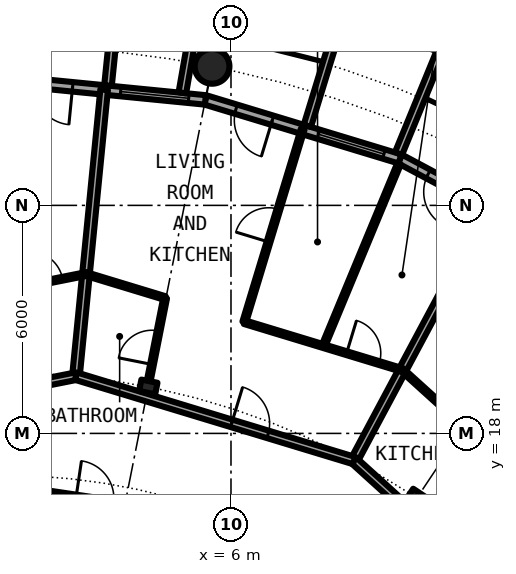
"""IFC4 building model, lengths in metres.
Left out: names, types, materials, properties, quantities, classifications, styles, units other than length and angle.
Written with IfcOpenShell. Run it as: python <this file> out.ifc"""

import sys

from ifc_helpers import new_model, si_unit, direction, frame, frame_2d, origin, origin_2d, place, context, subcontext, project, spatial, rectangle, circle, hollow_circle, i_section, extrude, element, fill, save


model = new_model("IFC4")
c1 = context("Model", 3, precision=1e-05, world=origin(), true_north=direction((0.0, 1.0)))
c2 = subcontext(c1, "Body", "Model", "MODEL_VIEW")
j1 = project(units=[si_unit("LENGTHUNIT", "METRE"), si_unit("PLANEANGLEUNIT", "RADIAN")], contexts=[c1])
p1 = place(None, origin())
s1 = spatial("IfcSite", under=j1, at=p1, CompositionType="ELEMENT")
p2 = place(p1, origin())
s2 = spatial("IfcBuilding", under=s1, at=p2, CompositionType="ELEMENT")
p3 = place(p2, frame((0.0, 0.0, 129.95)))
s3 = spatial("IfcBuildingStorey", under=s2, at=p3, CompositionType="ELEMENT", Elevation=129.95)
p4 = place(p3, frame((5.501, 27.658, 0.0), z_axis=(0.0, 0.0, 1.0), x_axis=(1.0, 0.0, 0.0)))
e1 = element("IfcColumn", 1, at=p4, inside=s3, PredefinedType="COLUMN", context=c2, shape_type="SweptSolid", body=[
    extrude(hollow_circle(Radius=0.457, WallThickness=0.04, at=origin_2d()), origin(), (0.0, 0.0, 1.0), 3.05),
])
for number, where, z_axis, x_axis in (
    (2, (10.889, 16.297, 0.0), (0.0, 0.0, 1.0), (0.556, 0.831, 0.0)),
    (3, (3.824, 19.223, 0.0), (0.0, 0.0, 1.0), (0.195, 0.981, 0.0)),
):
    element("IfcColumn", number, at=place(p3, frame(where, z_axis=z_axis, x_axis=x_axis)), inside=s3, PredefinedType="COLUMN", context=c2, shape_type="SweptSolid", body=[
        extrude(i_section(OverallWidth=0.307, OverallDepth=0.432, WebThickness=0.021, FlangeThickness=0.04, FilletRadius=0.027, at=origin_2d()), origin(), (0.0, 0.0, 1.0), 3.05),
    ])
p5 = place(p3, frame((15.167, 22.699, 0.0), z_axis=(0.0, 0.0, 1.0), x_axis=(-0.881915646801, 0.471407246368, 0.0)))
e4 = element("IfcWall", 4, at=p5, inside=s3, PredefinedType="SOLIDWALL", context=c2, shape_type="SweptSolid", body=[
    extrude(rectangle(XDim=5.352, YDim=0.25, at=frame_2d((2.676, 0.0))), origin(), (0.0, 0.0, 1.0), 2.7),
])
p6 = place(p5, frame((0.441, 0.0, 0.3)))
e5 = element("IfcOpeningElement", 5, at=p6, cuts=e4, PredefinedType="OPENING", context=c2, shape_type="SweptSolid", body=[
    extrude(rectangle(XDim=1.8, YDim=2.1, at=frame_2d((0.9, 1.05))), frame((0.0, 0.135, 0.0), z_axis=(0.0, -1.0, 0.0), x_axis=(1.0, 0.0, 0.0)), (0.0, 0.0, 1.0), 0.27),
])
p7 = place(p5, frame((3.51, 0.0, 0.0)))
e6 = element("IfcOpeningElement", 6, at=p7, cuts=e4, PredefinedType="OPENING", context=c2, shape_type="SweptSolid", body=[
    extrude(rectangle(XDim=1.0, YDim=2.2, at=frame_2d((0.5, 1.1))), frame((0.0, 0.135, 0.0), z_axis=(0.0, -1.0, 0.0), x_axis=(1.0, 0.0, 0.0)), (0.0, 0.0, 1.0), 0.27),
])
p8 = place(p3, frame((10.447, 25.222, 0.0), z_axis=(0.0, 0.0, 1.0), x_axis=(-0.956965678721, 0.290201119486, 0.0)))
e7 = element("IfcWall", 7, at=p8, inside=s3, PredefinedType="SOLIDWALL", context=c2, shape_type="SweptSolid", body=[
    extrude(rectangle(XDim=5.351, YDim=0.25, at=frame_2d((2.676, 0.0))), origin(), (0.0, 0.0, 1.0), 2.7),
])
p9 = place(p8, frame((0.441, 0.0, 0.3)))
e8 = element("IfcOpeningElement", 8, at=p9, cuts=e7, PredefinedType="OPENING", context=c2, shape_type="SweptSolid", body=[
    extrude(rectangle(XDim=1.8, YDim=2.1, at=frame_2d((0.9, 1.05))), frame((0.0, 0.135, 0.0), z_axis=(0.0, -1.0, 0.0), x_axis=(1.0, 0.0, 0.0)), (0.0, 0.0, 1.0), 0.27),
])
p10 = place(p8, frame((3.51, 0.0, 0.0)))
e9 = element("IfcOpeningElement", 9, at=p10, cuts=e7, PredefinedType="OPENING", context=c2, shape_type="SweptSolid", body=[
    extrude(rectangle(XDim=1.0, YDim=2.2, at=frame_2d((0.5, 1.1))), frame((0.0, 0.135, 0.0), z_axis=(0.0, -1.0, 0.0), x_axis=(1.0, 0.0, 0.0)), (0.0, 0.0, 1.0), 0.27),
])
p11 = place(p3, frame((11.638, 28.084, -0.03), z_axis=(0.0, 0.0, 1.0), x_axis=(-0.941461077774, 0.337121697664, 0.0)))
e10 = element("IfcWall", 10, at=p11, inside=s3, PredefinedType="SOLIDWALL", context=c2, shape_type="SweptSolid", body=[
    extrude(rectangle(XDim=2.993, YDim=0.2, at=frame_2d((1.497, 0.0))), origin(), (0.0, 0.0, 1.0), 2.73),
])
p12 = place(p11, frame((0.457, 0.0, 0.33)))
e11 = element("IfcOpeningElement", 11, at=p12, cuts=e10, PredefinedType="OPENING", context=c2, shape_type="SweptSolid", body=[
    extrude(circle(Radius=1.04, at=frame_2d((1.04, 1.04))), frame((0.0, 0.11, 0.0), z_axis=(0.0, -1.0, 0.0), x_axis=(1.0, 0.0, 0.0)), (0.0, 0.0, 1.0), 0.22),
])
p13 = place(p3, frame((10.409, 25.364, -0.03), z_axis=(0.0, 0.0, 1.0), x_axis=(0.379509886562, 0.925187681501, 0.0)))
e12 = element("IfcWall", 12, at=p13, inside=s3, PredefinedType="SOLIDWALL", context=c2, shape_type="SweptSolid", body=[
    extrude(rectangle(XDim=2.883, YDim=0.2, at=frame_2d((1.441, 0.0))), origin(), (0.0, 0.0, 1.0), 2.73),
])
p14 = place(p3, frame((8.009, 26.092, -0.03), z_axis=(0.0, 0.0, 1.0), x_axis=(0.293406695073, 0.955987715029, 0.0)))
e13 = element("IfcWall", 13, at=p14, inside=s3, PredefinedType="SOLIDWALL", context=c2, shape_type="SweptSolid", body=[
    extrude(rectangle(XDim=3.006, YDim=0.2, at=frame_2d((1.503, 0.0))), origin(), (0.0, 0.0, 1.0), 2.73),
])
p15 = place(p3, frame((5.326, 26.775, 0.0), z_axis=(0.0, 0.0, 1.0), x_axis=(-0.995173996315, 0.098126026407, 0.0)))
e14 = element("IfcWall", 14, at=p15, inside=s3, PredefinedType="SOLIDWALL", context=c2, shape_type="SweptSolid", body=[
    extrude(rectangle(XDim=5.352, YDim=0.25, at=frame_2d((2.676, 0.0))), origin(), (0.0, 0.0, 1.0), 2.7),
])
p16 = place(p15, frame((0.441, 0.0, 0.3)))
e15 = element("IfcOpeningElement", 15, at=p16, cuts=e14, PredefinedType="OPENING", context=c2, shape_type="SweptSolid", body=[
    extrude(rectangle(XDim=1.8, YDim=2.1, at=frame_2d((0.9, 1.05))), frame((0.0, 0.135, 0.0), z_axis=(0.0, -1.0, 0.0), x_axis=(1.0, 0.0, 0.0)), (0.0, 0.0, 1.0), 0.27),
])
p17 = place(p15, frame((3.51, 0.0, 0.0)))
e16 = element("IfcOpeningElement", 16, at=p17, cuts=e14, PredefinedType="OPENING", context=c2, shape_type="SweptSolid", body=[
    extrude(rectangle(XDim=1.0, YDim=2.2, at=frame_2d((0.5, 1.1))), frame((0.0, 0.135, 0.0), z_axis=(0.0, -1.0, 0.0), x_axis=(1.0, 0.0, 0.0)), (0.0, 0.0, 1.0), 0.27),
])
p18 = place(p3, frame((4.72, 26.961, -0.03), z_axis=(0.0, 0.0, 1.0), x_axis=(0.172463232037, 0.98501595601, 0.0)))
e17 = element("IfcWall", 17, at=p18, inside=s3, PredefinedType="SOLIDWALL", context=c2, shape_type="SweptSolid", body=[
    extrude(rectangle(XDim=2.929, YDim=0.2, at=frame_2d((1.464, 0.0))), origin(), (0.0, 0.0, 1.0), 2.73),
])
p19 = place(p3, frame((2.764, 27.153, -0.03), z_axis=(0.0, 0.0, 1.0), x_axis=(0.101505487237, 0.994834979311, 0.0)))
e18 = element("IfcWall", 18, at=p19, inside=s3, PredefinedType="SOLIDWALL", context=c2, shape_type="SweptSolid", body=[
    extrude(rectangle(XDim=3.007, YDim=0.2, at=frame_2d((1.503, 0.0))), origin(), (0.0, 0.0, 1.0), 2.73),
])
p20 = place(p3, frame((1.92, 19.506, 0.0), z_axis=(0.0, 0.0, 1.0), x_axis=(0.097987704654, 0.995187625394, 0.0)))
e19 = element("IfcWall", 19, at=p20, inside=s3, PredefinedType="PARTITIONING", context=c2, shape_type="SweptSolid", body=[
    extrude(rectangle(XDim=7.574, YDim=0.2, at=frame_2d((3.787, 0.0))), origin(), (0.0, 0.0, 1.0), 2.7),
])
p21 = place(p3, frame((3.847, 19.439, 0.0), z_axis=(0.0, 0.0, 1.0), x_axis=(0.194227580483, 0.980956495967, 0.0)))
e20 = element("IfcWall", 20, at=p21, inside=s3, PredefinedType="PARTITIONING", context=c2, shape_type="SweptSolid", body=[
    extrude(rectangle(XDim=2.163, YDim=0.1, at=frame_2d((1.082, 0.0))), origin(), (0.0, 0.0, 1.0), 2.7),
])
p22 = place(p21, frame((0.383, 0.0, 0.0)))
e21 = element("IfcOpeningElement", 21, at=p22, cuts=e20, PredefinedType="OPENING", context=c2, shape_type="SweptSolid", body=[
    extrude(rectangle(XDim=0.9, YDim=2.3, at=frame_2d((0.45, 1.15))), frame((0.0, 0.06, 0.0), z_axis=(0.0, -1.0, 0.0), x_axis=(1.0, 0.0, 0.0)), (0.0, 0.0, 1.0), 0.12),
])
p23 = place(p3, frame((6.349, 20.93, 0.0), z_axis=(0.0, 0.0, 1.0), x_axis=(0.290172218727, 0.956974442438, 0.0)))
e22 = element("IfcWall", 22, at=p23, inside=s3, PredefinedType="PARTITIONING", context=c2, shape_type="SweptSolid", body=[
    extrude(rectangle(XDim=5.303, YDim=0.1, at=frame_2d((2.652, 0.0))), origin(), (0.0, 0.0, 1.0), 2.7),
])
p24 = place(p23, frame((2.202, 0.0, 0.0)))
e23 = element("IfcOpeningElement", 23, at=p24, cuts=e22, PredefinedType="OPENING", context=c2, shape_type="SweptSolid", body=[
    extrude(rectangle(XDim=0.9, YDim=2.3, at=frame_2d((0.45, 1.15))), frame((0.0, 0.06, 0.0), z_axis=(0.0, -1.0, 0.0), x_axis=(1.0, 0.0, 0.0)), (0.0, 0.0, 1.0), 0.12),
])
p25 = place(p3, frame((8.431, 20.298, 0.0), z_axis=(0.0, 0.0, 1.0), x_axis=(0.383480536297, 0.923548958248, 0.0)))
e24 = element("IfcWall", 24, at=p25, inside=s3, PredefinedType="PARTITIONING", context=c2, shape_type="SweptSolid", body=[
    extrude(rectangle(XDim=5.195, YDim=0.1, at=frame_2d((2.598, 0.0))), origin(), (0.0, 0.0, 1.0), 2.7),
])
p26 = place(p3, frame((9.239, 17.286, 0.0), z_axis=(0.0, 0.0, 1.0), x_axis=(0.471439510802, 0.881898399848, 0.0)))
e25 = element("IfcWall", 25, at=p26, inside=s3, PredefinedType="PARTITIONING", context=c2, shape_type="SweptSolid", body=[
    extrude(rectangle(XDim=7.575, YDim=0.2, at=frame_2d((3.787, 0.0))), origin(), (0.0, 0.0, 1.0), 2.7),
])
p27 = place(p3, frame((-1.656, 16.819, 0.0), z_axis=(0.0, 0.0, 1.0), x_axis=(0.989174071716, -0.146746910856, 0.0)))
e26 = element("IfcWall", 26, at=p27, inside=s3, PredefinedType="PARTITIONING", context=c2, shape_type="SweptSolid", body=[
    extrude(rectangle(XDim=8.212, YDim=0.2, at=frame_2d((4.106, 0.0))), origin(), (0.0, 0.0, 1.0), 2.7),
])
p28 = place(p27, frame((3.614, 0.0, 0.0)))
e27 = element("IfcOpeningElement", 27, at=p28, cuts=e26, PredefinedType="OPENING", context=c2, shape_type="SweptSolid", body=[
    extrude(rectangle(XDim=1.0, YDim=2.3, at=frame_2d((0.5, 1.15))), frame((0.0, 0.11, 0.0), z_axis=(0.0, -1.0, 0.0), x_axis=(1.0, 0.0, 0.0)), (0.0, 0.0, 1.0), 0.22),
])
p29 = place(p3, frame((-9.239, 17.286, 0.0), z_axis=(0.0, 0.0, 1.0), x_axis=(0.98077905287, 0.195121627328, 0.0)))
e28 = element("IfcWall", 28, at=p29, inside=s3, PredefinedType="PARTITIONING", context=c2, shape_type="SweptSolid", body=[
    extrude(rectangle(XDim=11.379, YDim=0.2, at=frame_2d((5.689, 0.0))), origin(), (0.0, 0.0, 1.0), 2.39),
])
p30 = place(p29, frame((6.138, 0.0, 0.0)))
e29 = element("IfcOpeningElement", 29, at=p30, cuts=e28, PredefinedType="OPENING", context=c2, shape_type="SweptSolid", body=[
    extrude(rectangle(XDim=1.0, YDim=2.3, at=frame_2d((0.5, 1.15))), frame((0.0, 0.11, 0.0), z_axis=(0.0, -1.0, 0.0), x_axis=(1.0, 0.0, 0.0)), (0.0, 0.0, 1.0), 0.22),
])
p31 = place(p3, frame((9.232, 17.289, 0.0), z_axis=(0.0, 0.0, 1.0), x_axis=(0.741112328493, -0.67138105168, 0.0)))
e30 = element("IfcWall", 30, at=p31, inside=s3, PredefinedType="PARTITIONING", context=c2, shape_type="SweptSolid", body=[
    extrude(rectangle(XDim=5.752, YDim=0.2, at=frame_2d((2.876, 0.0))), origin(), (0.0, 0.0, 1.0), 2.7),
])
p32 = place(p31, frame((4.27, 0.0, 0.0)))
e31 = element("IfcOpeningElement", 31, at=p32, cuts=e30, PredefinedType="OPENING", context=c2, shape_type="SweptSolid", body=[
    extrude(rectangle(XDim=1.0, YDim=2.3, at=frame_2d((0.5, 1.15))), frame((0.0, 0.11, 0.0), z_axis=(0.0, -1.0, 0.0), x_axis=(1.0, 0.0, 0.0)), (0.0, 0.0, 1.0), 0.22),
])
p33 = place(p3, frame((1.921, 19.506, 0.0), z_axis=(0.0, 0.0, 1.0), x_axis=(0.956929842753, -0.290319265721, 0.0)))
e32 = element("IfcWall", 32, at=p33, inside=s3, PredefinedType="PARTITIONING", context=c2, shape_type="SweptSolid", body=[
    extrude(rectangle(XDim=7.647, YDim=0.2, at=frame_2d((3.824, 0.0))), origin(), (0.0, 0.0, 1.0), 2.39),
])
p34 = place(p33, frame((4.28, 0.0, 0.0)))
e33 = element("IfcOpeningElement", 33, at=p34, cuts=e32, PredefinedType="OPENING", context=c2, shape_type="SweptSolid", body=[
    extrude(rectangle(XDim=1.0, YDim=2.3, at=frame_2d((0.5, 1.15))), frame((0.0, 0.11, 0.0), z_axis=(0.0, -1.0, 0.0), x_axis=(1.0, 0.0, 0.0)), (0.0, 0.0, 1.0), 0.22),
])
p35 = place(p3, frame((-2.048, 21.351, 0.0), z_axis=(0.0, 0.0, 1.0), x_axis=(0.980784647647, 0.19509350307, 0.0)))
e34 = element("IfcWall", 34, at=p35, inside=s3, PredefinedType="PARTITIONING", context=c2, shape_type="SweptSolid", body=[
    extrude(rectangle(XDim=4.316, YDim=0.1, at=frame_2d((2.158, 0.0))), origin(), (0.0, 0.0, 1.0), 2.7),
])
p36 = place(p35, frame((2.788, 0.0, 0.0)))
e35 = element("IfcOpeningElement", 35, at=p36, cuts=e34, PredefinedType="OPENING", context=c2, shape_type="SweptSolid", body=[
    extrude(rectangle(XDim=0.9, YDim=2.3, at=frame_2d((0.45, 1.15))), frame((0.0, 0.06, 0.0), z_axis=(0.0, -1.0, 0.0), x_axis=(1.0, 0.0, 0.0)), (0.0, 0.0, 1.0), 0.12),
])
p37 = place(p3, frame((10.509, 19.669, 0.0), z_axis=(0.0, 0.0, 1.0), x_axis=(0.7410823244, -0.671414170584, 0.0)))
e36 = element("IfcWall", 36, at=p37, inside=s3, PredefinedType="PARTITIONING", context=c2, shape_type="SweptSolid", body=[
    extrude(rectangle(XDim=4.338, YDim=0.1, at=frame_2d((2.169, 0.0))), origin(), (0.0, 0.0, 1.0), 2.7),
])
p38 = place(p3, frame((2.186, 22.193, 0.0), z_axis=(0.0, 0.0, 1.0), x_axis=(0.956838221976, -0.290621088303, 0.0)))
e37 = element("IfcWall", 37, at=p38, inside=s3, PredefinedType="PARTITIONING", context=c2, shape_type="SweptSolid", body=[
    extrude(rectangle(XDim=2.175, YDim=0.1, at=frame_2d((1.087, 0.0))), origin(), (0.0, 0.0, 1.0), 2.7),
])
p39 = place(p3, frame((6.351, 20.928, 0.0), z_axis=(0.0, 0.0, 1.0), x_axis=(0.956861661621, -0.290543904633, 0.0)))
e38 = element("IfcWall", 38, at=p39, inside=s3, PredefinedType="PARTITIONING", context=c2, shape_type="SweptSolid", body=[
    extrude(rectangle(XDim=4.357, YDim=0.1, at=frame_2d((2.178, 0.0))), origin(), (0.0, 0.0, 1.0), 2.7),
])
p40 = place(p39, frame((2.812, 0.0, 0.0)))
e39 = element("IfcOpeningElement", 39, at=p40, cuts=e38, PredefinedType="OPENING", context=c2, shape_type="SweptSolid", body=[
    extrude(rectangle(XDim=0.9, YDim=2.3, at=frame_2d((0.45, 1.15))), frame((0.0, 0.06, 0.0), z_axis=(0.0, -1.0, 0.0), x_axis=(1.0, 0.0, 0.0)), (0.0, 0.0, 1.0), 0.12),
])
p41 = place(p7, origin())
e40 = element("IfcDoor", 40, at=p41, inside=s3, OperationType="SINGLE_SWING_LEFT", PredefinedType="DOOR", context=c2, shape_type="SweptSolid", body=[
    extrude(rectangle(XDim=1.0, YDim=2.2, at=frame_2d((0.5, 1.1))), frame((0.0, 0.025, 0.0), z_axis=(0.0, -1.0, 0.0), x_axis=(1.0, 0.0, 0.0)), (0.0, 0.0, 1.0), 0.05),
])
fill(e6, e40)
p42 = place(p9, origin())
e41 = element("IfcWindow", 41, at=p42, inside=s3, PartitioningType="SINGLE_PANEL", PredefinedType="WINDOW", context=c2, shape_type="SweptSolid", body=[
    extrude(rectangle(XDim=1.8, YDim=2.1, at=frame_2d((0.9, 1.05))), frame((0.0, 0.03, 0.0), z_axis=(0.0, -1.0, 0.0), x_axis=(1.0, 0.0, 0.0)), (0.0, 0.0, 1.0), 0.06),
])
fill(e8, e41)
p43 = place(p10, origin())
e42 = element("IfcDoor", 42, at=p43, inside=s3, OperationType="SINGLE_SWING_LEFT", PredefinedType="DOOR", context=c2, shape_type="SweptSolid", body=[
    extrude(rectangle(XDim=1.0, YDim=2.2, at=frame_2d((0.5, 1.1))), frame((0.0, 0.025, 0.0), z_axis=(0.0, -1.0, 0.0), x_axis=(1.0, 0.0, 0.0)), (0.0, 0.0, 1.0), 0.05),
])
fill(e9, e42)
p44 = place(p16, origin())
e43 = element("IfcWindow", 43, at=p44, inside=s3, PartitioningType="SINGLE_PANEL", PredefinedType="WINDOW", context=c2, shape_type="SweptSolid", body=[
    extrude(rectangle(XDim=1.8, YDim=2.1, at=frame_2d((0.9, 1.05))), frame((0.0, 0.03, 0.0), z_axis=(0.0, -1.0, 0.0), x_axis=(1.0, 0.0, 0.0)), (0.0, 0.0, 1.0), 0.06),
])
fill(e15, e43)
p45 = place(p17, origin())
e44 = element("IfcDoor", 44, at=p45, inside=s3, OperationType="SINGLE_SWING_LEFT", PredefinedType="DOOR", context=c2, shape_type="SweptSolid", body=[
    extrude(rectangle(XDim=1.0, YDim=2.2, at=frame_2d((0.5, 1.1))), frame((0.0, 0.025, 0.0), z_axis=(0.0, -1.0, 0.0), x_axis=(1.0, 0.0, 0.0)), (0.0, 0.0, 1.0), 0.05),
])
fill(e16, e44)
p46 = place(p34, origin())
e45 = element("IfcDoor", 45, at=p46, inside=s3, OperationType="SINGLE_SWING_RIGHT", PredefinedType="DOOR", context=c2, shape_type="SweptSolid", body=[
    extrude(rectangle(XDim=1.0, YDim=2.3, at=frame_2d((0.5, 1.15))), frame((0.0, 0.025, 0.0), z_axis=(0.0, -1.0, 0.0), x_axis=(1.0, 0.0, 0.0)), (0.0, 0.0, 1.0), 0.05),
])
fill(e33, e45)
p47 = place(p22, origin())
e46 = element("IfcDoor", 46, at=p47, inside=s3, OperationType="SINGLE_SWING_LEFT", PredefinedType="DOOR", context=c2, shape_type="SweptSolid", body=[
    extrude(rectangle(XDim=0.9, YDim=2.3, at=frame_2d((0.45, 1.15))), frame((0.0, 0.025, 0.0), z_axis=(0.0, -1.0, 0.0), x_axis=(1.0, 0.0, 0.0)), (0.0, 0.0, 1.0), 0.05),
])
fill(e21, e46)
p48 = place(p24, origin())
e47 = element("IfcDoor", 47, at=p48, inside=s3, OperationType="SINGLE_SWING_RIGHT", PredefinedType="DOOR", context=c2, shape_type="SweptSolid", body=[
    extrude(rectangle(XDim=0.9, YDim=2.3, at=frame_2d((0.45, 1.15))), frame((0.0, 0.025, 0.0), z_axis=(0.0, -1.0, 0.0), x_axis=(1.0, 0.0, 0.0)), (0.0, 0.0, 1.0), 0.05),
])
fill(e23, e47)
p49 = place(p40, origin())
e48 = element("IfcDoor", 48, at=p49, inside=s3, OperationType="SINGLE_SWING_RIGHT", PredefinedType="DOOR", context=c2, shape_type="SweptSolid", body=[
    extrude(rectangle(XDim=0.9, YDim=2.3, at=frame_2d((0.45, 1.15))), frame((0.0, 0.025, 0.0), z_axis=(0.0, -1.0, 0.0), x_axis=(1.0, 0.0, 0.0)), (0.0, 0.0, 1.0), 0.05),
])
fill(e39, e48)
p50 = place(p36, origin())
e49 = element("IfcDoor", 49, at=p50, inside=s3, OperationType="SINGLE_SWING_RIGHT", PredefinedType="DOOR", context=c2, shape_type="SweptSolid", body=[
    extrude(rectangle(XDim=0.9, YDim=2.3, at=frame_2d((0.45, 1.15))), frame((0.0, 0.025, 0.0), z_axis=(0.0, -1.0, 0.0), x_axis=(1.0, 0.0, 0.0)), (0.0, 0.0, 1.0), 0.05),
])
fill(e35, e49)
save(model, sys.argv[1])
